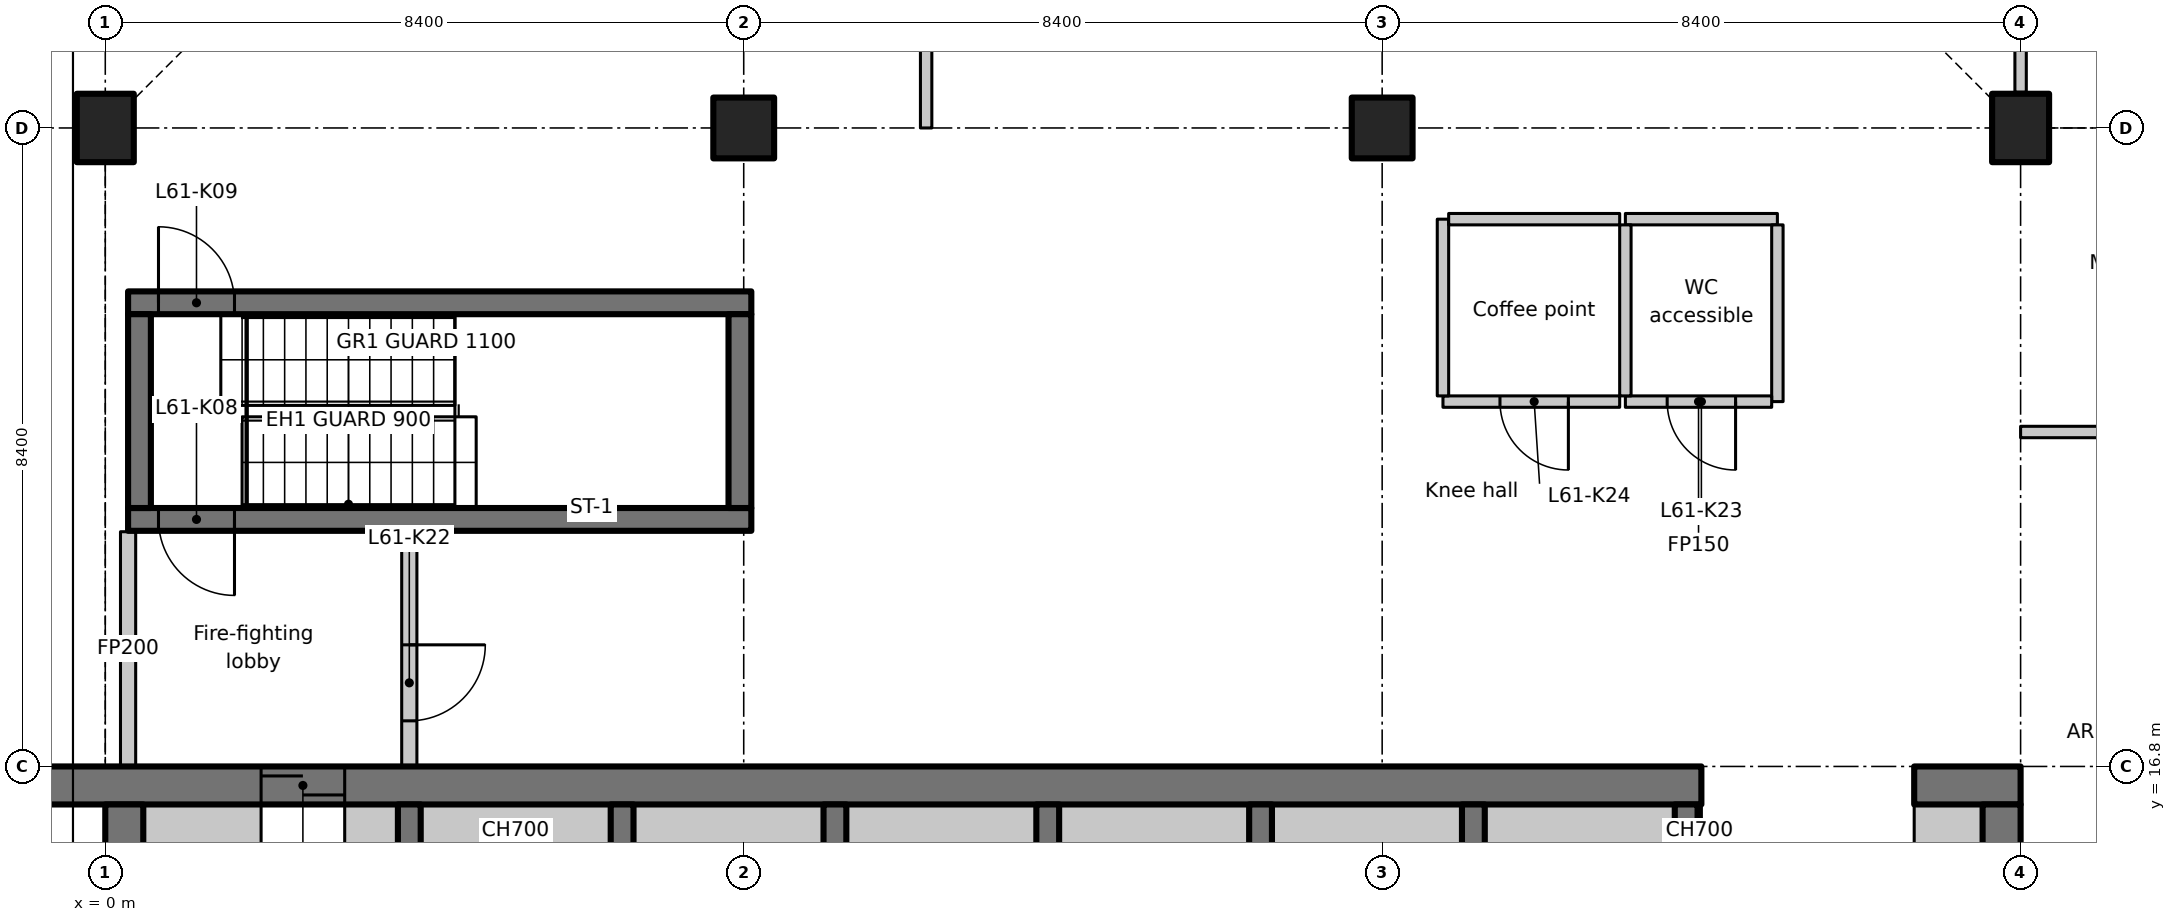
"""IFC4 building model, lengths in metres.
Left out: names, types, materials, properties, quantities, classifications, styles, units other than length and angle.
Written with IfcOpenShell. Run it as: python <this file> out.ifc"""

import sys

from ifc_helpers import new_model, si_unit, direction, frame, frame_2d, origin, origin_2d, place, context, subcontext, project, spatial, polyline, rectangle, outline, extrude, element, fill, save


model = new_model("IFC4")
c1 = context("Model", 3, precision=1e-05, world=origin(), true_north=direction((0.0, 1.0)))
c2 = subcontext(c1, "Body", "Model", "MODEL_VIEW")
j1 = project(units=[si_unit("LENGTHUNIT", "METRE"), si_unit("PLANEANGLEUNIT", "RADIAN")], contexts=[c1])
p1 = place(None, origin())
s1 = spatial("IfcSite", under=j1, at=p1, CompositionType="ELEMENT")
p2 = place(p1, origin())
s2 = spatial("IfcBuilding", under=s1, at=p2, CompositionType="ELEMENT")
p3 = place(p2, frame((0.0, 0.0, 240.9)))
s3 = spatial("IfcBuildingStorey", under=s2, at=p3, CompositionType="ELEMENT", Elevation=240.9)
p4 = place(p3, frame((0.0, 25.2, 0.0), z_axis=(0.0, 0.0, 1.0), x_axis=(1.0, 0.0, 0.0)))
e1 = element("IfcColumn", 1, at=p4, inside=s3, PredefinedType="COLUMN", context=c2, shape_type="SweptSolid", body=[
    extrude(rectangle(XDim=0.75, YDim=0.9, at=origin_2d()), origin(), (0.0, 0.0, 1.0), 3.35),
])
for number, where, z_axis, x_axis in (
    (2, (8.4, 25.2, 0.0), (0.0, 0.0, 1.0), (1.0, 0.0, 0.0)),
    (3, (16.8, 25.2, 0.0), (0.0, 0.0, 1.0), (1.0, 0.0, 0.0)),
):
    element("IfcColumn", number, at=place(p3, frame(where, z_axis=z_axis, x_axis=x_axis)), inside=s3, PredefinedType="COLUMN", context=c2, shape_type="SweptSolid", body=[
        extrude(rectangle(XDim=0.8, YDim=0.8, at=origin_2d()), origin(), (0.0, 0.0, 1.0), 3.35),
    ])
p5 = place(p3, frame((25.2, 25.2, 0.0), z_axis=(0.0, 0.0, 1.0), x_axis=(1.0, 0.0, 0.0)))
e4 = element("IfcColumn", 4, at=p5, inside=s3, PredefinedType="COLUMN", context=c2, shape_type="SweptSolid", body=[
    extrude(rectangle(XDim=0.75, YDim=0.9, at=origin_2d()), origin(), (0.0, 0.0, 1.0), 3.35),
])
p6 = place(p3, frame((-1.1, 16.55, 0.0), z_axis=(0.0, 0.0, 1.0), x_axis=(1.0, 0.0, 0.0)))
e5 = element("IfcWall", 5, at=p6, inside=s3, PredefinedType="SHEAR", context=c2, shape_type="SweptSolid", body=[
    extrude(rectangle(XDim=22.1, YDim=0.5, at=frame_2d((11.05, 0.0))), origin(), (0.0, 0.0, 1.0), 3.35),
])
p7 = place(p6, frame((3.15, 0.0, 0.0)))
e6 = element("IfcOpeningElement", 6, at=p7, cuts=e5, PredefinedType="OPENING", context=c2, shape_type="SweptSolid", body=[
    extrude(rectangle(XDim=1.1, YDim=2.3, at=frame_2d((0.55, 1.15))), frame((0.0, 0.26, 0.0), z_axis=(0.0, -1.0, 0.0), x_axis=(1.0, 0.0, 0.0)), (0.0, 0.0, 1.0), 0.52),
])
p8 = place(p3, frame((23.8, 16.55, 0.0), z_axis=(0.0, 0.0, 1.0), x_axis=(1.0, 0.0, 0.0)))
e7 = element("IfcWall", 7, at=p8, inside=s3, PredefinedType="SHEAR", context=c2, shape_type="SweptSolid", body=[
    extrude(rectangle(XDim=1.4, YDim=0.5, at=frame_2d((0.7, 0.0))), origin(), (0.0, 0.0, 1.0), 3.35),
])
p9 = place(p3, frame((0.25, 7.436, 0.0), z_axis=(0.0, 0.0, 1.0), x_axis=(0.0, 1.0, 0.0)))
e8 = element("IfcWall", 8, at=p9, inside=s3, PredefinedType="SHEAR", context=c2, shape_type="SweptSolid", body=[
    extrude(rectangle(XDim=8.864, YDim=0.5, at=frame_2d((4.432, 0.0))), origin(), (0.0, 0.0, 1.0), 3.35),
])
p10 = place(p3, frame((24.95, 12.6, 0.0), z_axis=(0.0, 0.0, 1.0), x_axis=(0.0, 1.0, 0.0)))
e9 = element("IfcWall", 9, at=p10, inside=s3, PredefinedType="SHEAR", context=c2, shape_type="SweptSolid", body=[
    extrude(rectangle(XDim=3.7, YDim=0.5, at=frame_2d((1.85, 0.0))), origin(), (0.0, 0.0, 1.0), 3.35),
])
p11 = place(p3, frame((0.5, 15.95, 0.0), z_axis=(0.0, 0.0, 1.0), x_axis=(1.0, 0.0, 0.0)))
e10 = element("IfcWall", 10, at=p11, inside=s3, PredefinedType="PARTITIONING", context=c2, shape_type="SweptSolid", body=[
    extrude(rectangle(XDim=1.55, YDim=0.7, at=frame_2d((0.775, 0.0))), origin(), (0.0, 0.0, 1.0), 3.35),
])
p12 = place(p3, frame((23.8, 15.95, 0.0), z_axis=(0.0, 0.0, 1.0), x_axis=(1.0, 0.0, 0.0)))
e11 = element("IfcWall", 11, at=p12, inside=s3, PredefinedType="PARTITIONING", context=c2, shape_type="SweptSolid", body=[
    extrude(rectangle(XDim=0.9, YDim=0.7, at=frame_2d((0.45, 0.0))), origin(), (0.0, 0.0, 1.0), 3.35),
])
for number, where, z_axis, x_axis in (
    (12, (4.0, 12.95, 0.0), (0.0, 0.0, 1.0), (0.0, 1.0, 0.0)),
    (13, (6.8, 12.95, 0.0), (0.0, 0.0, 1.0), (0.0, 1.0, 0.0)),
    (14, (9.6, 12.95, 0.0), (0.0, 0.0, 1.0), (0.0, 1.0, 0.0)),
    (15, (12.4, 12.95, 0.0), (0.0, 0.0, 1.0), (0.0, 1.0, 0.0)),
    (16, (15.2, 12.95, 0.0), (0.0, 0.0, 1.0), (0.0, 1.0, 0.0)),
    (17, (18.0, 12.95, 0.0), (0.0, 0.0, 1.0), (0.0, 1.0, 0.0)),
    (18, (20.8, 12.95, 0.0), (0.0, 0.0, 1.0), (0.0, 1.0, 0.0)),
):
    element("IfcWall", number, at=place(p3, frame(where, z_axis=z_axis, x_axis=x_axis)), inside=s3, PredefinedType="SHEAR", context=c2, shape_type="SweptSolid", body=[
        extrude(rectangle(XDim=3.35, YDim=0.3, at=frame_2d((1.675, 0.0))), origin(), (0.0, 0.0, 1.0), 3.35),
    ])
p13 = place(p3, frame((8.5, 20.05, 0.0), z_axis=(0.0, 0.0, 1.0), x_axis=(-1.0, 0.0, 0.0)))
e19 = element("IfcWall", 19, at=p13, inside=s3, PredefinedType="SHEAR", context=c2, shape_type="SweptSolid", body=[
    extrude(rectangle(XDim=8.2, YDim=0.3, at=frame_2d((4.1, 0.0))), origin(), (0.0, 0.0, 1.0), 3.35),
])
p14 = place(p13, frame((6.8, 0.0, 0.0)))
e20 = element("IfcOpeningElement", 20, at=p14, cuts=e19, PredefinedType="OPENING", context=c2, shape_type="SweptSolid", body=[
    extrude(rectangle(XDim=1.0, YDim=2.1, at=frame_2d((0.5, 1.05))), frame((0.0, 0.16, 0.0), z_axis=(0.0, -1.0, 0.0), x_axis=(1.0, 0.0, 0.0)), (0.0, 0.0, 1.0), 0.32),
])
p15 = place(p3, frame((0.3, 22.9, 0.0), z_axis=(0.0, 0.0, 1.0), x_axis=(1.0, 0.0, 0.0)))
e21 = element("IfcWall", 21, at=p15, inside=s3, PredefinedType="SHEAR", context=c2, shape_type="SweptSolid", body=[
    extrude(rectangle(XDim=8.2, YDim=0.3, at=frame_2d((4.1, 0.0))), origin(), (0.0, 0.0, 1.0), 3.35),
])
p16 = place(p15, frame((0.4, 0.0, 0.0)))
e22 = element("IfcOpeningElement", 22, at=p16, cuts=e21, PredefinedType="OPENING", context=c2, shape_type="SweptSolid", body=[
    extrude(rectangle(XDim=1.0, YDim=2.1, at=frame_2d((0.5, 1.05))), frame((0.0, 0.16, 0.0), z_axis=(0.0, -1.0, 0.0), x_axis=(1.0, 0.0, 0.0)), (0.0, 0.0, 1.0), 0.32),
])
for number, where, z_axis, x_axis in (
    (23, (0.45, 20.2, 0.0), (0.0, 0.0, 1.0), (0.0, 1.0, 0.0)),
    (24, (8.35, 20.2, 0.0), (0.0, 0.0, 1.0), (0.0, 1.0, 0.0)),
):
    element("IfcWall", number, at=place(p3, frame(where, z_axis=z_axis, x_axis=x_axis)), inside=s3, PredefinedType="SHEAR", context=c2, shape_type="SweptSolid", body=[
        extrude(rectangle(XDim=2.55, YDim=0.3, at=frame_2d((1.275, 0.0))), origin(), (0.0, 0.0, 1.0), 3.35),
    ])
p17 = place(p3, frame((0.3, 16.812, 0.0), z_axis=(0.0, 0.0, 1.0), x_axis=(0.0, 1.0, 0.0)))
e25 = element("IfcWall", 25, at=p17, inside=s3, PredefinedType="PARTITIONING", context=c2, shape_type="SweptSolid", body=[
    extrude(rectangle(XDim=3.076, YDim=0.2, at=frame_2d((1.538, 0.0))), origin(), (0.0, 0.0, 1.0), 2.98),
])
p18 = place(p3, frame((4.0, 19.888, 0.0), z_axis=(0.0, 0.0, 1.0), x_axis=(0.0, -1.0, 0.0)))
e26 = element("IfcWall", 26, at=p18, inside=s3, PredefinedType="PARTITIONING", context=c2, shape_type="SweptSolid", body=[
    extrude(rectangle(XDim=3.076, YDim=0.2, at=frame_2d((1.538, 0.0))), origin(), (0.0, 0.0, 1.0), 3.35),
])
p19 = place(p18, frame((1.488, 0.0, 0.0)))
e27 = element("IfcOpeningElement", 27, at=p19, cuts=e26, PredefinedType="OPENING", context=c2, shape_type="SweptSolid", body=[
    extrude(rectangle(XDim=1.0, YDim=2.1, at=frame_2d((0.5, 1.05))), frame((0.0, 0.11, 0.0), z_axis=(0.0, -1.0, 0.0), x_axis=(1.0, 0.0, 0.0)), (0.0, 0.0, 1.0), 0.22),
])
p20 = place(p3, frame((20.0, 24.0, 0.0), z_axis=(0.0, 0.0, 1.0), x_axis=(1.0, 0.0, 0.0)))
e28 = element("IfcWall", 28, at=p20, inside=s3, PredefinedType="PARTITIONING", context=c2, shape_type="SweptSolid", body=[
    extrude(rectangle(XDim=2.0, YDim=0.15, at=frame_2d((1.0, 0.0))), origin(), (0.0, 0.0, 1.0), 3.35),
])
p21 = place(p3, frame((22.0, 23.925, 0.0), z_axis=(0.0, 0.0, 1.0), x_axis=(0.0, -1.0, 0.0)))
e29 = element("IfcWall", 29, at=p21, inside=s3, PredefinedType="PARTITIONING", context=c2, shape_type="SweptSolid", body=[
    extrude(rectangle(XDim=2.325, YDim=0.15, at=frame_2d((1.163, 0.0))), origin(), (0.0, 0.0, 1.0), 3.35),
])
p22 = place(p3, frame((21.925, 21.6, 0.0), z_axis=(0.0, 0.0, 1.0), x_axis=(-1.0, 0.0, 0.0)))
e30 = element("IfcWall", 30, at=p22, inside=s3, PredefinedType="PARTITIONING", context=c2, shape_type="SweptSolid", body=[
    extrude(rectangle(XDim=1.925, YDim=0.15, at=frame_2d((0.962, 0.0))), origin(), (0.0, 0.0, 1.0), 3.35),
])
p23 = place(p22, frame((0.475, 0.0, 0.0)))
e31 = element("IfcOpeningElement", 31, at=p23, cuts=e30, PredefinedType="OPENING", context=c2, shape_type="SweptSolid", body=[
    extrude(rectangle(XDim=0.9, YDim=2.1, at=frame_2d((0.45, 1.05))), frame((0.0, 0.085, 0.0), z_axis=(0.0, -1.0, 0.0), x_axis=(1.0, 0.0, 0.0)), (0.0, 0.0, 1.0), 0.17),
])
p24 = place(p3, frame((20.0, 21.675, 0.0), z_axis=(0.0, 0.0, 1.0), x_axis=(0.0, 1.0, 0.0)))
e32 = element("IfcWall", 32, at=p24, inside=s3, PredefinedType="PARTITIONING", context=c2, shape_type="SweptSolid", body=[
    extrude(rectangle(XDim=2.25, YDim=0.15, at=frame_2d((1.125, 0.0))), origin(), (0.0, 0.0, 1.0), 3.35),
])
p25 = place(p3, frame((19.925, 21.6, 0.0), z_axis=(0.0, 0.0, 1.0), x_axis=(-1.0, 0.0, 0.0)))
e33 = element("IfcWall", 33, at=p25, inside=s3, PredefinedType="PARTITIONING", context=c2, shape_type="SweptSolid", body=[
    extrude(rectangle(XDim=2.325, YDim=0.15, at=frame_2d((1.163, 0.0))), origin(), (0.0, 0.0, 1.0), 3.35),
])
p26 = place(p25, frame((0.675, 0.0, 0.0)))
e34 = element("IfcOpeningElement", 34, at=p26, cuts=e33, PredefinedType="OPENING", context=c2, shape_type="SweptSolid", body=[
    extrude(rectangle(XDim=0.9, YDim=2.1, at=frame_2d((0.45, 1.05))), frame((0.0, 0.085, 0.0), z_axis=(0.0, -1.0, 0.0), x_axis=(1.0, 0.0, 0.0)), (0.0, 0.0, 1.0), 0.17),
])
p27 = place(p3, frame((17.6, 21.675, 0.0), z_axis=(0.0, 0.0, 1.0), x_axis=(0.0, 1.0, 0.0)))
e35 = element("IfcWall", 35, at=p27, inside=s3, PredefinedType="PARTITIONING", context=c2, shape_type="SweptSolid", body=[
    extrude(rectangle(XDim=2.325, YDim=0.15, at=frame_2d((1.163, 0.0))), origin(), (0.0, 0.0, 1.0), 3.35),
])
p28 = place(p3, frame((17.675, 24.0, 0.0), z_axis=(0.0, 0.0, 1.0), x_axis=(1.0, 0.0, 0.0)))
e36 = element("IfcWall", 36, at=p28, inside=s3, PredefinedType="PARTITIONING", context=c2, shape_type="SweptSolid", body=[
    extrude(rectangle(XDim=2.25, YDim=0.15, at=frame_2d((1.125, 0.0))), origin(), (0.0, 0.0, 1.0), 3.35),
])
p29 = place(p3, frame((3.15, 15.95, 0.0), z_axis=(0.0, 0.0, 1.0), x_axis=(1.0, 0.0, 0.0)))
e37 = element("IfcWall", 37, at=p29, inside=s3, PredefinedType="PARTITIONING", context=c2, shape_type="SweptSolid", body=[
    extrude(rectangle(XDim=0.7, YDim=0.7, at=frame_2d((0.35, 0.0))), origin(), (0.0, 0.0, 1.0), 3.35),
])
for number, where, z_axis, x_axis in (
    (38, (4.15, 15.95, 0.0), (0.0, 0.0, 1.0), (1.0, 0.0, 0.0)),
    (39, (6.95, 15.95, 0.0), (0.0, 0.0, 1.0), (1.0, 0.0, 0.0)),
    (40, (9.75, 15.95, 0.0), (0.0, 0.0, 1.0), (1.0, 0.0, 0.0)),
    (41, (12.55, 15.95, 0.0), (0.0, 0.0, 1.0), (1.0, 0.0, 0.0)),
    (42, (15.35, 15.95, 0.0), (0.0, 0.0, 1.0), (1.0, 0.0, 0.0)),
    (43, (18.15, 15.95, 0.0), (0.0, 0.0, 1.0), (1.0, 0.0, 0.0)),
):
    element("IfcWall", number, at=place(p3, frame(where, z_axis=z_axis, x_axis=x_axis)), inside=s3, PredefinedType="PARTITIONING", context=c2, shape_type="SweptSolid", body=[
        extrude(rectangle(XDim=2.5, YDim=0.7, at=frame_2d((1.25, 0.0))), origin(), (0.0, 0.0, 1.0), 3.35),
    ])
p30 = place(p3, frame((20.95, 15.95, 0.0), z_axis=(0.0, 0.0, 1.0), x_axis=(1.0, 0.0, 0.0)))
e44 = element("IfcWall", 44, at=p30, inside=s3, PredefinedType="PARTITIONING", context=c2, shape_type="SweptSolid", body=[
    extrude(rectangle(XDim=0.05, YDim=0.7, at=frame_2d((0.025, 0.0))), origin(), (0.0, 0.0, 1.0), 3.35),
])
p31 = place(p3, frame((25.2, 21.2, 0.0), z_axis=(0.0, 0.0, 1.0), x_axis=(1.0, 0.0, 0.0)))
e45 = element("IfcWall", 45, at=p31, inside=s3, PredefinedType="PARTITIONING", context=c2, shape_type="SweptSolid", body=[
    extrude(rectangle(XDim=4.2, YDim=0.15, at=frame_2d((2.1, 0.0))), origin(), (0.0, 0.0, 1.0), 3.33),
])
p32 = place(p31, frame((1.5, 0.0, 0.0)))
e46 = element("IfcOpeningElement", 46, at=p32, cuts=e45, PredefinedType="OPENING", context=c2, shape_type="SweptSolid", body=[
    extrude(rectangle(XDim=1.0, YDim=2.1, at=frame_2d((0.5, 1.05))), frame((0.0, 0.085, 0.0), z_axis=(0.0, -1.0, 0.0), x_axis=(1.0, 0.0, 0.0)), (0.0, 0.0, 1.0), 0.17),
])
p33 = place(p3, frame((25.2, 25.67, 0.0), z_axis=(0.0, 0.0, 1.0), x_axis=(0.0, 1.0, 0.0)))
e47 = element("IfcWall", 47, at=p33, inside=s3, PredefinedType="PARTITIONING", context=c2, shape_type="SweptSolid", body=[
    extrude(rectangle(XDim=4.487, YDim=0.15, at=frame_2d((2.243, 0.0))), origin(), (0.0, 0.0, 1.0), 2.98),
])
p34 = place(p3, frame((10.8, 25.2, 0.0), z_axis=(0.0, 0.0, 1.0), x_axis=(0.0, 1.0, 0.0)))
e48 = element("IfcWall", 48, at=p34, inside=s3, PredefinedType="PARTITIONING", context=c2, shape_type="SweptSolid", body=[
    extrude(outline(polyline([(0.0, 0.0), (8.4, 0.0), (8.4, 2.98), (7.952, 2.98), (7.95, 3.33), (0.0, 3.33), (0.0, 0.0)])), frame((0.0, 0.075, 0.0), z_axis=(0.0, -1.0, 0.0), x_axis=(1.0, 0.0, 0.0)), (0.0, 0.0, 1.0), 0.15),
])
p35 = place(p34, frame((3.3, 0.0, 0.0)))
e49 = element("IfcOpeningElement", 49, at=p35, cuts=e48, PredefinedType="OPENING", context=c2, shape_type="SweptSolid", body=[
    extrude(rectangle(XDim=1.6, YDim=2.1, at=frame_2d((0.8, 1.05))), frame((0.0, 0.085, 0.0), z_axis=(0.0, -1.0, 0.0), x_axis=(1.0, 0.0, 0.0)), (0.0, 0.0, 1.0), 0.17),
])
p36 = place(p7, origin())
e50 = element("IfcDoor", 50, at=p36, inside=s3, OperationType="SLIDING_TO_LEFT", PredefinedType="DOOR", context=c2, shape_type="SweptSolid", body=[
    extrude(rectangle(XDim=1.1, YDim=2.3, at=frame_2d((0.55, 1.15))), frame((0.0, 0.025, 0.0), z_axis=(0.0, -1.0, 0.0), x_axis=(1.0, 0.0, 0.0)), (0.0, 0.0, 1.0), 0.05),
])
fill(e6, e50)
p37 = place(p14, origin())
e51 = element("IfcDoor", 51, at=p37, inside=s3, OperationType="SINGLE_SWING_LEFT", PredefinedType="DOOR", context=c2, shape_type="SweptSolid", body=[
    extrude(rectangle(XDim=1.0, YDim=2.1, at=frame_2d((0.5, 1.05))), frame((0.0, 0.025, 0.0), z_axis=(0.0, -1.0, 0.0), x_axis=(1.0, 0.0, 0.0)), (0.0, 0.0, 1.0), 0.05),
])
fill(e20, e51)
p38 = place(p16, origin())
e52 = element("IfcDoor", 52, at=p38, inside=s3, OperationType="SINGLE_SWING_RIGHT", PredefinedType="DOOR", context=c2, shape_type="SweptSolid", body=[
    extrude(rectangle(XDim=1.0, YDim=2.1, at=frame_2d((0.5, 1.05))), frame((0.0, 0.025, 0.0), z_axis=(0.0, -1.0, 0.0), x_axis=(1.0, 0.0, 0.0)), (0.0, 0.0, 1.0), 0.05),
])
fill(e22, e52)
p39 = place(p19, origin())
e53 = element("IfcDoor", 53, at=p39, inside=s3, OperationType="SINGLE_SWING_LEFT", PredefinedType="DOOR", context=c2, shape_type="SweptSolid", body=[
    extrude(rectangle(XDim=1.0, YDim=2.1, at=frame_2d((0.5, 1.05))), frame((0.0, 0.025, 0.0), z_axis=(0.0, -1.0, 0.0), x_axis=(1.0, 0.0, 0.0)), (0.0, 0.0, 1.0), 0.05),
])
fill(e27, e53)
p40 = place(p23, origin())
e54 = element("IfcDoor", 54, at=p40, inside=s3, OperationType="SINGLE_SWING_RIGHT", PredefinedType="DOOR", context=c2, shape_type="SweptSolid", body=[
    extrude(rectangle(XDim=0.9, YDim=2.1, at=frame_2d((0.45, 1.05))), frame((0.0, 0.025, 0.0), z_axis=(0.0, -1.0, 0.0), x_axis=(1.0, 0.0, 0.0)), (0.0, 0.0, 1.0), 0.05),
])
fill(e31, e54)
p41 = place(p26, origin())
e55 = element("IfcDoor", 55, at=p41, inside=s3, OperationType="SINGLE_SWING_LEFT", PredefinedType="DOOR", context=c2, shape_type="SweptSolid", body=[
    extrude(rectangle(XDim=0.9, YDim=2.1, at=frame_2d((0.45, 1.05))), frame((0.0, 0.025, 0.0), z_axis=(0.0, -1.0, 0.0), x_axis=(1.0, 0.0, 0.0)), (0.0, 0.0, 1.0), 0.05),
])
fill(e34, e55)
save(model, sys.argv[1])
